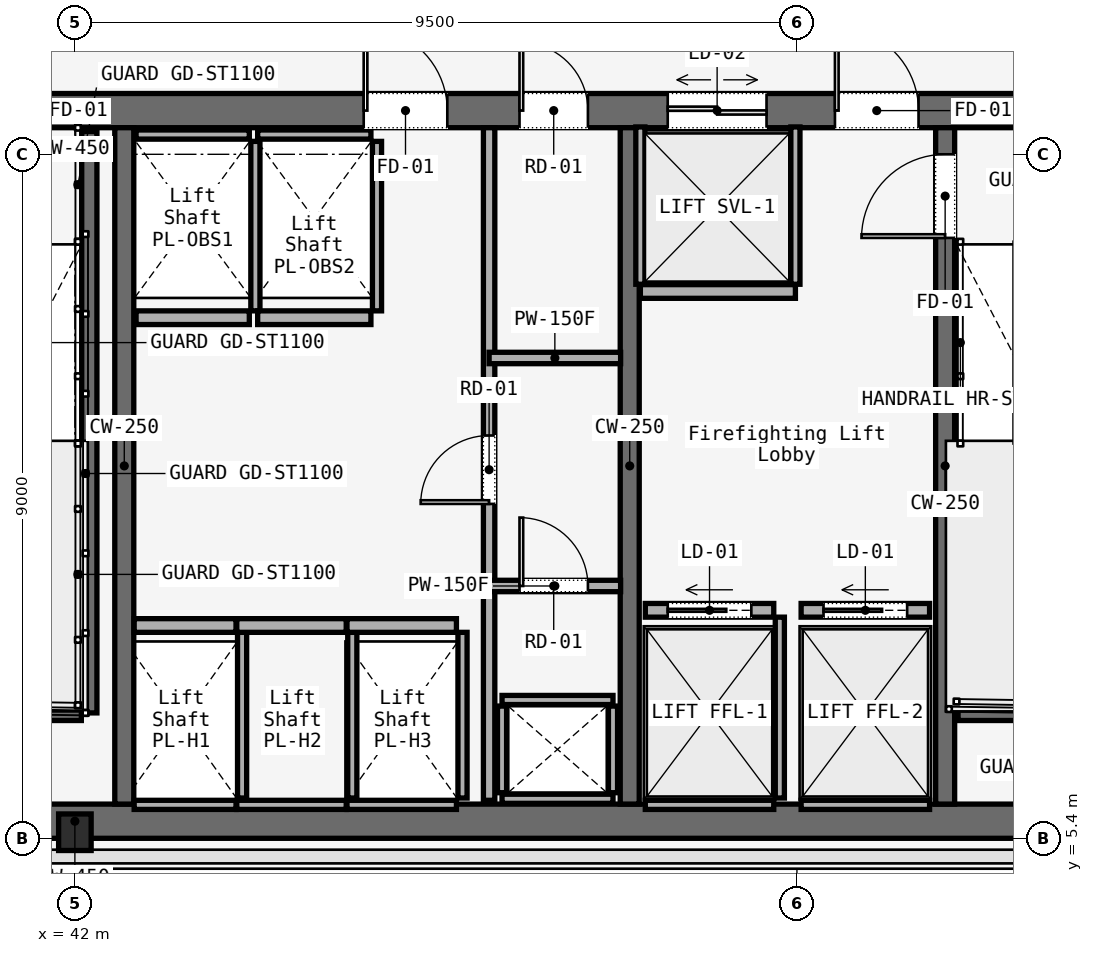
"""IFC4 building model, lengths in metres.
Left out: names, types, materials, properties, quantities, classifications, styles, units other than length and angle.
Written with IfcOpenShell. Run it as: python <this file> out.ifc"""

import sys

from ifc_helpers import new_model, si_unit, direction, frame, frame_2d, origin, origin_2d, place, context, subcontext, project, spatial, rectangle, i_section, extrude, element, fill, save


model = new_model("IFC4")
c1 = context("Model", 3, precision=1e-05, world=origin(), true_north=direction((0.0, 1.0)))
c2 = subcontext(c1, "Body", "Model", "MODEL_VIEW")
j1 = project(units=[si_unit("LENGTHUNIT", "METRE"), si_unit("PLANEANGLEUNIT", "RADIAN")], contexts=[c1])
p1 = place(None, origin())
s1 = spatial("IfcSite", under=j1, at=p1, CompositionType="ELEMENT")
p2 = place(p1, origin())
s2 = spatial("IfcBuilding", under=s1, at=p2, CompositionType="ELEMENT")
p3 = place(p2, frame((0.0, 0.0, 134.6)))
s3 = spatial("IfcBuildingStorey", under=s2, at=p3, CompositionType="ELEMENT", Elevation=134.6)
p4 = place(p3, frame((26.45, 14.975, 0.0), z_axis=(0.0, 0.0, 1.0), x_axis=(1.0, 0.0, 0.0)))
e1 = element("IfcWall", 1, at=p4, inside=s3, PredefinedType="SOLIDWALL", context=c2, shape_type="SweptSolid", body=[
    extrude(rectangle(XDim=31.1, YDim=0.45, at=frame_2d((15.55, 0.0))), origin(), (0.0, 0.0, 1.0), 3.58),
])
p5 = place(p4, frame((1.65, 0.0, 0.0)))
e2 = element("IfcOpeningElement", 2, at=p5, cuts=e1, PredefinedType="OPENING", context=c2, shape_type="SweptSolid", body=[
    extrude(rectangle(XDim=1.1, YDim=2.2, at=frame_2d((0.55, 1.1))), frame((0.0, 0.225, 0.0), z_axis=(0.0, -1.0, 0.0), x_axis=(1.0, 0.0, 0.0)), (0.0, 0.0, 1.0), 0.45),
])
p6 = place(p4, frame((13.65, 0.0, 0.0)))
e3 = element("IfcOpeningElement", 3, at=p6, cuts=e1, PredefinedType="OPENING", context=c2, shape_type="SweptSolid", body=[
    extrude(rectangle(XDim=1.1, YDim=2.2, at=frame_2d((0.55, 1.1))), frame((0.0, 0.225, 0.0), z_axis=(0.0, -1.0, 0.0), x_axis=(1.0, 0.0, 0.0)), (0.0, 0.0, 1.0), 0.45),
])
p7 = place(p4, frame((25.55, 0.0, 0.0)))
e4 = element("IfcOpeningElement", 4, at=p7, cuts=e1, PredefinedType="OPENING", context=c2, shape_type="SweptSolid", body=[
    extrude(rectangle(XDim=1.1, YDim=2.2, at=frame_2d((0.55, 1.1))), frame((0.0, 0.225, 0.0), z_axis=(0.0, -1.0, 0.0), x_axis=(1.0, 0.0, 0.0)), (0.0, 0.0, 1.0), 0.45),
])
p8 = place(p4, frame((10.7, 0.0, 0.0)))
e5 = element("IfcOpeningElement", 5, at=p8, cuts=e1, PredefinedType="OPENING", context=c2, shape_type="SweptSolid", body=[
    extrude(rectangle(XDim=1.4, YDim=2.2, at=frame_2d((0.7, 1.1))), frame((0.0, 0.225, 0.0), z_axis=(0.0, -1.0, 0.0), x_axis=(1.0, 0.0, 0.0)), (0.0, 0.0, 1.0), 0.45),
])
p9 = place(p4, frame((19.35, 0.0, 0.0)))
e6 = element("IfcOpeningElement", 6, at=p9, cuts=e1, PredefinedType="OPENING", context=c2, shape_type="SweptSolid", body=[
    extrude(rectangle(XDim=1.1, YDim=2.2, at=frame_2d((0.55, 1.1))), frame((0.0, 0.225, 0.0), z_axis=(0.0, -1.0, 0.0), x_axis=(1.0, 0.0, 0.0)), (0.0, 0.0, 1.0), 0.45),
])
p10 = place(p4, frame((21.4, 0.0, 0.0)))
e7 = element("IfcOpeningElement", 7, at=p10, cuts=e1, PredefinedType="OPENING", context=c2, shape_type="SweptSolid", body=[
    extrude(rectangle(XDim=0.9, YDim=2.1, at=frame_2d((0.45, 1.05))), frame((0.0, 0.225, 0.0), z_axis=(0.0, -1.0, 0.0), x_axis=(1.0, 0.0, 0.0)), (0.0, 0.0, 1.0), 0.45),
])
p11 = place(p4, frame((23.35, 0.0, 0.0)))
e8 = element("IfcOpeningElement", 8, at=p11, cuts=e1, PredefinedType="OPENING", context=c2, shape_type="SweptSolid", body=[
    extrude(rectangle(XDim=1.3, YDim=2.3, at=frame_2d((0.65, 1.15))), frame((0.0, 0.225, 0.0), z_axis=(0.0, -1.0, 0.0), x_axis=(1.0, 0.0, 0.0)), (0.0, 0.0, 1.0), 0.45),
])
p12 = place(p3, frame((26.45, 5.625, 0.0), z_axis=(0.0, 0.0, 1.0), x_axis=(1.0, 0.0, 0.0)))
e9 = element("IfcWall", 9, at=p12, inside=s3, PredefinedType="SOLIDWALL", context=c2, shape_type="SweptSolid", body=[
    extrude(rectangle(XDim=31.1, YDim=0.45, at=frame_2d((15.55, 0.0))), origin(), (0.0, 0.0, 1.0), 3.58),
])
for number, where, z_axis, x_axis in (
    (10, (42.65, 5.85, 0.0), (0.0, 0.0, 1.0), (0.0, 1.0, 0.0)),
    (11, (49.3, 5.85, 0.0), (0.0, 0.0, 1.0), (0.0, 1.0, 0.0)),
):
    element("IfcWall", number, at=place(p3, frame(where, z_axis=z_axis, x_axis=x_axis)), inside=s3, PredefinedType="SOLIDWALL", context=c2, shape_type="SweptSolid", body=[
        extrude(rectangle(XDim=8.9, YDim=0.25, at=frame_2d((4.45, 0.0))), origin(), (0.0, 0.0, 1.0), 3.58),
    ])
p13 = place(p3, frame((53.45, 5.85, 0.0), z_axis=(0.0, 0.0, 1.0), x_axis=(0.0, 1.0, 0.0)))
e12 = element("IfcWall", 12, at=p13, inside=s3, PredefinedType="SOLIDWALL", context=c2, shape_type="SweptSolid", body=[
    extrude(rectangle(XDim=8.9, YDim=0.25, at=frame_2d((4.45, 0.0))), origin(), (0.0, 0.0, 1.0), 3.58),
])
p14 = place(p13, frame((7.45, 0.0, 0.0)))
e13 = element("IfcOpeningElement", 13, at=p14, cuts=e12, PredefinedType="OPENING", context=c2, shape_type="SweptSolid", body=[
    extrude(rectangle(XDim=1.1, YDim=2.2, at=frame_2d((0.55, 1.1))), frame((0.0, 0.125, 0.0), z_axis=(0.0, -1.0, 0.0), x_axis=(1.0, 0.0, 0.0)), (0.0, 0.0, 1.0), 0.25),
])
p15 = place(p3, frame((42.0, 5.48, 0.0), z_axis=(0.0, 0.0, 1.0), x_axis=(1.0, 0.0, 0.0)))
e14 = element("IfcColumn", 14, at=p15, inside=s3, PredefinedType="COLUMN", context=c2, shape_type="SweptSolid", body=[
    extrude(i_section(OverallWidth=0.428, OverallDepth=0.481, WebThickness=0.051, FlangeThickness=0.065, FilletRadius=0.015, at=origin_2d()), origin(), (0.0, 0.0, 1.0), 3.58),
])
p16 = place(p3, frame((42.19, 14.7, 0.0), z_axis=(0.0, 0.0, 1.0), x_axis=(0.0, -1.0, 0.0)))
e15 = element("IfcWall", 15, at=p16, inside=s3, PredefinedType="SOLIDWALL", context=c2, shape_type="SweptSolid", body=[
    extrude(rectangle(XDim=7.65, YDim=0.2, at=frame_2d((3.825, 0.0))), origin(), (0.0, 0.0, 1.0), 3.8),
])
for number, where, z_axis, x_axis in (
    (16, (38.97, 7.05, 0.0), (0.0, 0.0, 1.0), (1.0, 0.0, 0.0)),
    (17, (53.62, 7.05, 0.0), (0.0, 0.0, 1.0), (1.0, 0.0, 0.0)),
):
    element("IfcWall", number, at=place(p3, frame(where, z_axis=z_axis, x_axis=x_axis)), inside=s3, PredefinedType="SOLIDWALL", context=c2, shape_type="SweptSolid", body=[
        extrude(rectangle(XDim=3.115, YDim=0.2, at=frame_2d((1.558, 0.0))), origin(), (0.0, 0.0, 1.0), 3.8),
    ])
for number, where, z_axis, x_axis in (
    (18, (47.62, 5.92, 0.0), (0.0, 0.0, 1.0), (1.0, 0.0, 0.0)),
    (19, (47.62, 7.22, 0.0), (0.0, 0.0, 1.0), (1.0, 0.0, 0.0)),
):
    element("IfcWall", number, at=place(p3, frame(where, z_axis=z_axis, x_axis=x_axis)), inside=s3, PredefinedType="SOLIDWALL", context=c2, shape_type="SweptSolid", body=[
        extrude(rectangle(XDim=1.46, YDim=0.12, at=frame_2d((0.73, 0.0))), origin(), (0.0, 0.0, 1.0), 3.01),
    ])
for number, where, z_axis, x_axis in (
    (20, (47.62, 6.0, 0.0), (0.0, 0.0, 1.0), (0.0, 1.0, 0.0)),
    (21, (49.08, 6.0, 0.0), (0.0, 0.0, 1.0), (0.0, 1.0, 0.0)),
):
    element("IfcWall", number, at=place(p3, frame(where, z_axis=z_axis, x_axis=x_axis)), inside=s3, PredefinedType="SOLIDWALL", context=c2, shape_type="SweptSolid", body=[
        extrude(rectangle(XDim=1.14, YDim=0.12, at=frame_2d((0.57, 0.0))), origin(), (0.0, 0.0, 1.0), 3.01),
    ])
p17 = place(p3, frame((47.45, 5.9, 0.0), z_axis=(0.0, 0.0, 1.0), x_axis=(0.0, 1.0, 0.0)))
e22 = element("IfcWall", 22, at=p17, inside=s3, PredefinedType="PARTITIONING", context=c2, shape_type="SweptSolid", body=[
    extrude(rectangle(XDim=8.85, YDim=0.15, at=frame_2d((4.425, 0.0))), origin(), (0.0, 0.0, 1.0), 3.01),
])
p18 = place(p17, frame((3.9, 0.0, 0.0)))
e23 = element("IfcOpeningElement", 23, at=p18, cuts=e22, PredefinedType="OPENING", context=c2, shape_type="SweptSolid", body=[
    extrude(rectangle(XDim=0.9, YDim=2.1, at=frame_2d((0.45, 1.05))), frame((0.0, 0.075, 0.0), z_axis=(0.0, -1.0, 0.0), x_axis=(1.0, 0.0, 0.0)), (0.0, 0.0, 1.0), 0.15),
])
p19 = place(p3, frame((47.45, 8.72, 0.0), z_axis=(0.0, 0.0, 1.0), x_axis=(1.0, 0.0, 0.0)))
e24 = element("IfcWall", 24, at=p19, inside=s3, PredefinedType="PARTITIONING", context=c2, shape_type="SweptSolid", body=[
    extrude(rectangle(XDim=1.73, YDim=0.15, at=frame_2d((0.865, 0.0))), origin(), (0.0, 0.0, 1.0), 3.01),
])
p20 = place(p19, frame((0.4, 0.0, 0.0)))
e25 = element("IfcOpeningElement", 25, at=p20, cuts=e24, PredefinedType="OPENING", context=c2, shape_type="SweptSolid", body=[
    extrude(rectangle(XDim=0.9, YDim=2.1, at=frame_2d((0.45, 1.05))), frame((0.0, 0.075, 0.0), z_axis=(0.0, -1.0, 0.0), x_axis=(1.0, 0.0, 0.0)), (0.0, 0.0, 1.0), 0.15),
])
p21 = place(p3, frame((47.45, 11.72, 0.0), z_axis=(0.0, 0.0, 1.0), x_axis=(1.0, 0.0, 0.0)))
e26 = element("IfcWall", 26, at=p21, inside=s3, PredefinedType="PARTITIONING", context=c2, shape_type="SweptSolid", body=[
    extrude(rectangle(XDim=1.73, YDim=0.15, at=frame_2d((0.865, 0.0))), origin(), (0.0, 0.0, 1.0), 3.01),
])
p22 = place(p3, frame((42.78, 8.2, 0.0), z_axis=(0.0, 0.0, 1.0), x_axis=(1.0, 0.0, 0.0)))
e27 = element("IfcWall", 27, at=p22, inside=s3, PredefinedType="SOLIDWALL", context=c2, shape_type="SweptSolid", body=[
    extrude(rectangle(XDim=1.34, YDim=0.18, at=frame_2d((0.67, 0.0))), origin(), (0.0, 0.0, 1.0), 3.01),
])
p23 = place(p3, frame((42.78, 5.84, 0.0), z_axis=(0.0, 0.0, 1.0), x_axis=(1.0, 0.0, 0.0)))
e28 = element("IfcWall", 28, at=p23, inside=s3, PredefinedType="SOLIDWALL", context=c2, shape_type="SweptSolid", body=[
    extrude(rectangle(XDim=1.34, YDim=0.12, at=frame_2d((0.67, 0.0))), origin(), (0.0, 0.0, 1.0), 3.01),
])
p24 = place(p3, frame((44.2, 5.93, 0.0), z_axis=(0.0, 0.0, 1.0), x_axis=(0.0, 1.0, 0.0)))
e29 = element("IfcWall", 29, at=p24, inside=s3, PredefinedType="SOLIDWALL", context=c2, shape_type="SweptSolid", body=[
    extrude(rectangle(XDim=2.18, YDim=0.12, at=frame_2d((1.09, 0.0))), origin(), (0.0, 0.0, 1.0), 3.01),
])
p25 = place(p3, frame((44.13, 8.2, 0.0), z_axis=(0.0, 0.0, 1.0), x_axis=(1.0, 0.0, 0.0)))
e30 = element("IfcWall", 30, at=p25, inside=s3, PredefinedType="SOLIDWALL", context=c2, shape_type="SweptSolid", body=[
    extrude(rectangle(XDim=1.44, YDim=0.18, at=frame_2d((0.72, 0.0))), origin(), (0.0, 0.0, 1.0), 3.01),
])
p26 = place(p3, frame((44.13, 5.84, 0.0), z_axis=(0.0, 0.0, 1.0), x_axis=(1.0, 0.0, 0.0)))
e31 = element("IfcWall", 31, at=p26, inside=s3, PredefinedType="SOLIDWALL", context=c2, shape_type="SweptSolid", body=[
    extrude(rectangle(XDim=1.44, YDim=0.12, at=frame_2d((0.72, 0.0))), origin(), (0.0, 0.0, 1.0), 3.01),
])
p27 = place(p3, frame((45.65, 5.93, 0.0), z_axis=(0.0, 0.0, 1.0), x_axis=(0.0, 1.0, 0.0)))
e32 = element("IfcWall", 32, at=p27, inside=s3, PredefinedType="SOLIDWALL", context=c2, shape_type="SweptSolid", body=[
    extrude(rectangle(XDim=2.18, YDim=0.12, at=frame_2d((1.09, 0.0))), origin(), (0.0, 0.0, 1.0), 3.01),
])
p28 = place(p3, frame((45.58, 8.2, 0.0), z_axis=(0.0, 0.0, 1.0), x_axis=(1.0, 0.0, 0.0)))
e33 = element("IfcWall", 33, at=p28, inside=s3, PredefinedType="SOLIDWALL", context=c2, shape_type="SweptSolid", body=[
    extrude(rectangle(XDim=1.44, YDim=0.18, at=frame_2d((0.72, 0.0))), origin(), (0.0, 0.0, 1.0), 3.01),
])
p29 = place(p3, frame((45.58, 5.84, 0.0), z_axis=(0.0, 0.0, 1.0), x_axis=(1.0, 0.0, 0.0)))
e34 = element("IfcWall", 34, at=p29, inside=s3, PredefinedType="SOLIDWALL", context=c2, shape_type="SweptSolid", body=[
    extrude(rectangle(XDim=1.44, YDim=0.12, at=frame_2d((0.72, 0.0))), origin(), (0.0, 0.0, 1.0), 3.01),
])
p30 = place(p3, frame((47.1, 5.93, 0.0), z_axis=(0.0, 0.0, 1.0), x_axis=(0.0, 1.0, 0.0)))
e35 = element("IfcWall", 35, at=p30, inside=s3, PredefinedType="SOLIDWALL", context=c2, shape_type="SweptSolid", body=[
    extrude(rectangle(XDim=2.18, YDim=0.12, at=frame_2d((1.09, 0.0))), origin(), (0.0, 0.0, 1.0), 3.01),
])
p31 = place(p3, frame((42.805, 12.25, 0.0), z_axis=(0.0, 0.0, 1.0), x_axis=(1.0, 0.0, 0.0)))
e36 = element("IfcWall", 36, at=p31, inside=s3, PredefinedType="SOLIDWALL", context=c2, shape_type="SweptSolid", body=[
    extrude(rectangle(XDim=1.49, YDim=0.18, at=frame_2d((0.745, 0.0))), origin(), (0.0, 0.0, 1.0), 3.01),
])
p32 = place(p3, frame((42.805, 14.66, 0.0), z_axis=(0.0, 0.0, 1.0), x_axis=(1.0, 0.0, 0.0)))
e37 = element("IfcWall", 37, at=p32, inside=s3, PredefinedType="SOLIDWALL", context=c2, shape_type="SweptSolid", body=[
    extrude(rectangle(XDim=1.49, YDim=0.12, at=frame_2d((0.745, 0.0))), origin(), (0.0, 0.0, 1.0), 3.01),
])
p33 = place(p3, frame((44.375, 12.34, 0.0), z_axis=(0.0, 0.0, 1.0), x_axis=(0.0, 1.0, 0.0)))
e38 = element("IfcWall", 38, at=p33, inside=s3, PredefinedType="SOLIDWALL", context=c2, shape_type="SweptSolid", body=[
    extrude(rectangle(XDim=2.23, YDim=0.12, at=frame_2d((1.115, 0.0))), origin(), (0.0, 0.0, 1.0), 3.01),
])
p34 = place(p3, frame((44.405, 12.25, 0.0), z_axis=(0.0, 0.0, 1.0), x_axis=(1.0, 0.0, 0.0)))
e39 = element("IfcWall", 39, at=p34, inside=s3, PredefinedType="SOLIDWALL", context=c2, shape_type="SweptSolid", body=[
    extrude(rectangle(XDim=1.49, YDim=0.18, at=frame_2d((0.745, 0.0))), origin(), (0.0, 0.0, 1.0), 3.01),
])
p35 = place(p3, frame((44.405, 14.66, 0.0), z_axis=(0.0, 0.0, 1.0), x_axis=(1.0, 0.0, 0.0)))
e40 = element("IfcWall", 40, at=p35, inside=s3, PredefinedType="SOLIDWALL", context=c2, shape_type="SweptSolid", body=[
    extrude(rectangle(XDim=1.49, YDim=0.12, at=frame_2d((0.745, 0.0))), origin(), (0.0, 0.0, 1.0), 3.01),
])
p36 = place(p3, frame((45.975, 12.34, 0.0), z_axis=(0.0, 0.0, 1.0), x_axis=(0.0, 1.0, 0.0)))
e41 = element("IfcWall", 41, at=p36, inside=s3, PredefinedType="SOLIDWALL", context=c2, shape_type="SweptSolid", body=[
    extrude(rectangle(XDim=2.23, YDim=0.12, at=frame_2d((1.115, 0.0))), origin(), (0.0, 0.0, 1.0), 3.01),
])
p37 = place(p3, frame((49.505, 8.4, 0.0), z_axis=(0.0, 0.0, 1.0), x_axis=(1.0, 0.0, 0.0)))
e42 = element("IfcWall", 42, at=p37, inside=s3, PredefinedType="SOLIDWALL", context=c2, shape_type="SweptSolid", body=[
    extrude(rectangle(XDim=1.69, YDim=0.18, at=frame_2d((0.845, 0.0))), origin(), (0.0, 0.0, 1.0), 3.01),
])
p38 = place(p37, frame((0.295, 0.0, 0.0)))
e43 = element("IfcOpeningElement", 43, at=p38, cuts=e42, PredefinedType="OPENING", context=c2, shape_type="SweptSolid", body=[
    extrude(rectangle(XDim=1.1, YDim=2.2, at=frame_2d((0.55, 1.1))), frame((0.0, 0.09, 0.0), z_axis=(0.0, -1.0, 0.0), x_axis=(1.0, 0.0, 0.0)), (0.0, 0.0, 1.0), 0.18),
])
p39 = place(p3, frame((49.505, 5.84, 0.0), z_axis=(0.0, 0.0, 1.0), x_axis=(1.0, 0.0, 0.0)))
e44 = element("IfcWall", 44, at=p39, inside=s3, PredefinedType="SOLIDWALL", context=c2, shape_type="SweptSolid", body=[
    extrude(rectangle(XDim=1.69, YDim=0.12, at=frame_2d((0.845, 0.0))), origin(), (0.0, 0.0, 1.0), 3.01),
])
p40 = place(p3, frame((51.275, 5.93, 0.0), z_axis=(0.0, 0.0, 1.0), x_axis=(0.0, 1.0, 0.0)))
e45 = element("IfcWall", 45, at=p40, inside=s3, PredefinedType="SOLIDWALL", context=c2, shape_type="SweptSolid", body=[
    extrude(rectangle(XDim=2.38, YDim=0.12, at=frame_2d((1.19, 0.0))), origin(), (0.0, 0.0, 1.0), 3.01),
])
p41 = place(p3, frame((51.555, 8.4, 0.0), z_axis=(0.0, 0.0, 1.0), x_axis=(1.0, 0.0, 0.0)))
e46 = element("IfcWall", 46, at=p41, inside=s3, PredefinedType="SOLIDWALL", context=c2, shape_type="SweptSolid", body=[
    extrude(rectangle(XDim=1.69, YDim=0.18, at=frame_2d((0.845, 0.0))), origin(), (0.0, 0.0, 1.0), 3.01),
])
p42 = place(p41, frame((0.295, 0.0, 0.0)))
e47 = element("IfcOpeningElement", 47, at=p42, cuts=e46, PredefinedType="OPENING", context=c2, shape_type="SweptSolid", body=[
    extrude(rectangle(XDim=1.1, YDim=2.2, at=frame_2d((0.55, 1.1))), frame((0.0, 0.09, 0.0), z_axis=(0.0, -1.0, 0.0), x_axis=(1.0, 0.0, 0.0)), (0.0, 0.0, 1.0), 0.18),
])
p43 = place(p3, frame((51.555, 5.84, 0.0), z_axis=(0.0, 0.0, 1.0), x_axis=(1.0, 0.0, 0.0)))
e48 = element("IfcWall", 48, at=p43, inside=s3, PredefinedType="SOLIDWALL", context=c2, shape_type="SweptSolid", body=[
    extrude(rectangle(XDim=1.69, YDim=0.12, at=frame_2d((0.845, 0.0))), origin(), (0.0, 0.0, 1.0), 3.01),
])
p44 = place(p3, frame((49.44, 12.595, 0.0), z_axis=(0.0, 0.0, 1.0), x_axis=(1.0, 0.0, 0.0)))
e49 = element("IfcWall", 49, at=p44, inside=s3, PredefinedType="SOLIDWALL", context=c2, shape_type="SweptSolid", body=[
    extrude(rectangle(XDim=2.04, YDim=0.18, at=frame_2d((1.02, 0.0))), origin(), (0.0, 0.0, 1.0), 3.01),
])
for number, where, z_axis, x_axis in (
    (50, (49.44, 12.69, 0.0), (0.0, 0.0, 1.0), (0.0, 1.0, 0.0)),
    (51, (51.48, 12.69, 0.0), (0.0, 0.0, 1.0), (0.0, 1.0, 0.0)),
):
    element("IfcWall", number, at=place(p3, frame(where, z_axis=z_axis, x_axis=x_axis)), inside=s3, PredefinedType="SOLIDWALL", context=c2, shape_type="SweptSolid", body=[
        extrude(rectangle(XDim=2.07, YDim=0.12, at=frame_2d((1.035, 0.0))), origin(), (0.0, 0.0, 1.0), 3.01),
    ])
p45 = place(p7, origin())
e52 = element("IfcDoor", 52, at=p45, inside=s3, OperationType="SINGLE_SWING_RIGHT", PredefinedType="DOOR", context=c2, shape_type="SweptSolid", body=[
    extrude(rectangle(XDim=1.1, YDim=2.2, at=frame_2d((0.55, 1.1))), frame((0.0, 0.025, 0.0), z_axis=(0.0, -1.0, 0.0), x_axis=(1.0, 0.0, 0.0)), (0.0, 0.0, 1.0), 0.05),
])
fill(e4, e52)
p46 = place(p9, origin())
e53 = element("IfcDoor", 53, at=p46, inside=s3, OperationType="SINGLE_SWING_LEFT", PredefinedType="DOOR", context=c2, shape_type="SweptSolid", body=[
    extrude(rectangle(XDim=1.1, YDim=2.2, at=frame_2d((0.55, 1.1))), frame((0.0, 0.025, 0.0), z_axis=(0.0, -1.0, 0.0), x_axis=(1.0, 0.0, 0.0)), (0.0, 0.0, 1.0), 0.05),
])
fill(e6, e53)
p47 = place(p10, origin())
e54 = element("IfcDoor", 54, at=p47, inside=s3, OperationType="SINGLE_SWING_LEFT", PredefinedType="DOOR", context=c2, shape_type="SweptSolid", body=[
    extrude(rectangle(XDim=0.9, YDim=2.1, at=frame_2d((0.45, 1.05))), frame((0.0, 0.025, 0.0), z_axis=(0.0, -1.0, 0.0), x_axis=(1.0, 0.0, 0.0)), (0.0, 0.0, 1.0), 0.05),
])
fill(e7, e54)
p48 = place(p14, origin())
e55 = element("IfcDoor", 55, at=p48, inside=s3, OperationType="SINGLE_SWING_LEFT", PredefinedType="DOOR", context=c2, shape_type="SweptSolid", body=[
    extrude(rectangle(XDim=1.1, YDim=2.2, at=frame_2d((0.55, 1.1))), frame((0.0, 0.025, 0.0), z_axis=(0.0, -1.0, 0.0), x_axis=(1.0, 0.0, 0.0)), (0.0, 0.0, 1.0), 0.05),
])
fill(e13, e55)
p49 = place(p18, origin())
e56 = element("IfcDoor", 56, at=p49, inside=s3, OperationType="SINGLE_SWING_LEFT", PredefinedType="DOOR", context=c2, shape_type="SweptSolid", body=[
    extrude(rectangle(XDim=0.9, YDim=2.1, at=frame_2d((0.45, 1.05))), frame((0.0, 0.025, 0.0), z_axis=(0.0, -1.0, 0.0), x_axis=(1.0, 0.0, 0.0)), (0.0, 0.0, 1.0), 0.05),
])
fill(e23, e56)
p50 = place(p20, origin())
e57 = element("IfcDoor", 57, at=p50, inside=s3, OperationType="SINGLE_SWING_RIGHT", PredefinedType="DOOR", context=c2, shape_type="SweptSolid", body=[
    extrude(rectangle(XDim=0.9, YDim=2.1, at=frame_2d((0.45, 1.05))), frame((0.0, 0.025, 0.0), z_axis=(0.0, -1.0, 0.0), x_axis=(1.0, 0.0, 0.0)), (0.0, 0.0, 1.0), 0.05),
])
fill(e25, e57)
p51 = place(p38, origin())
e58 = element("IfcDoor", 58, at=p51, inside=s3, OperationType="SLIDING_TO_LEFT", PredefinedType="DOOR", context=c2, shape_type="SweptSolid", body=[
    extrude(rectangle(XDim=1.1, YDim=2.2, at=frame_2d((0.55, 1.1))), frame((0.0, 0.025, 0.0), z_axis=(0.0, -1.0, 0.0), x_axis=(1.0, 0.0, 0.0)), (0.0, 0.0, 1.0), 0.05),
])
fill(e43, e58)
p52 = place(p42, origin())
e59 = element("IfcDoor", 59, at=p52, inside=s3, OperationType="SLIDING_TO_LEFT", PredefinedType="DOOR", context=c2, shape_type="SweptSolid", body=[
    extrude(rectangle(XDim=1.1, YDim=2.2, at=frame_2d((0.55, 1.1))), frame((0.0, 0.025, 0.0), z_axis=(0.0, -1.0, 0.0), x_axis=(1.0, 0.0, 0.0)), (0.0, 0.0, 1.0), 0.05),
])
fill(e47, e59)
p53 = place(p11, origin())
e60 = element("IfcDoor", 60, at=p53, inside=s3, OperationType="DOUBLE_DOOR_SLIDING", PredefinedType="DOOR", context=c2, shape_type="SweptSolid", body=[
    extrude(rectangle(XDim=1.3, YDim=2.3, at=frame_2d((0.65, 1.15))), frame((0.0, 0.025, 0.0), z_axis=(0.0, -1.0, 0.0), x_axis=(1.0, 0.0, 0.0)), (0.0, 0.0, 1.0), 0.05),
])
fill(e8, e60)
save(model, sys.argv[1])
